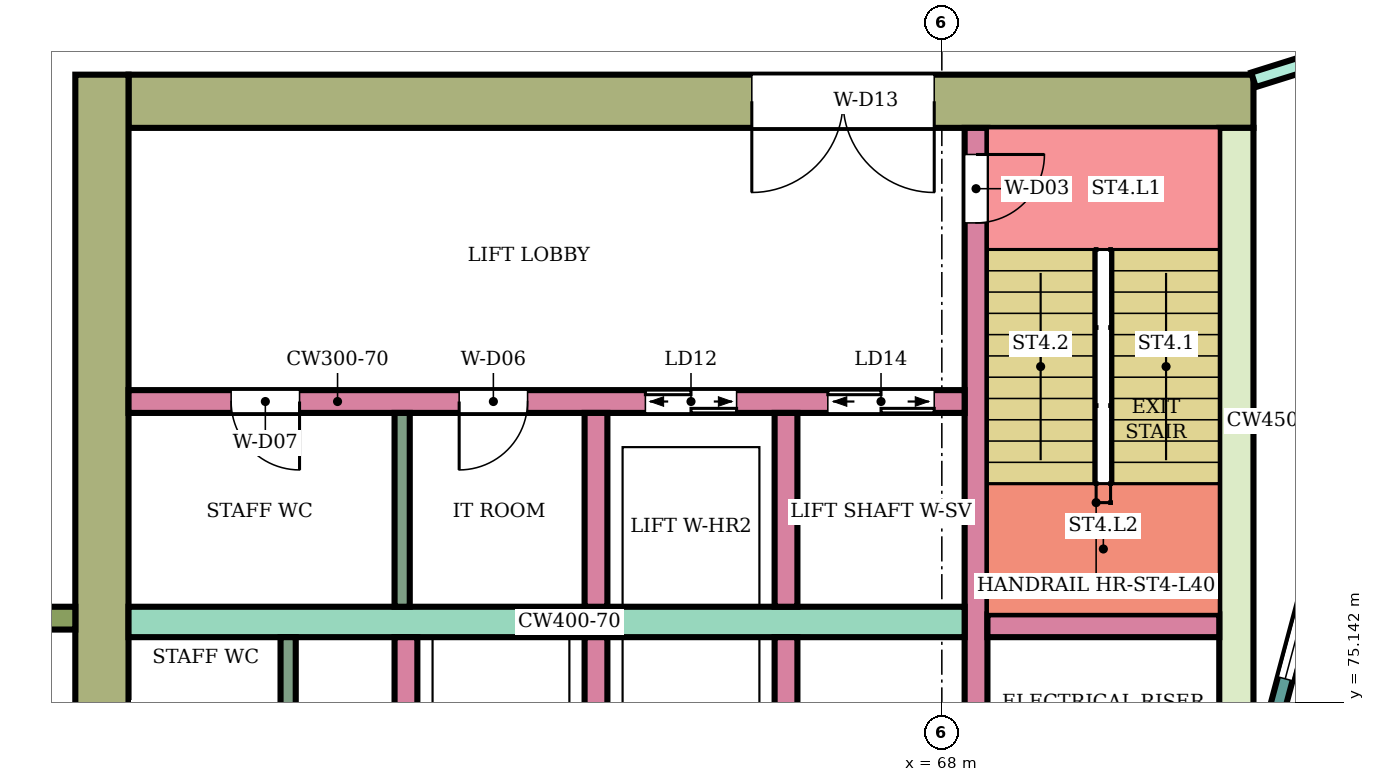
"""IFC4 building model, lengths in metres.
Left out: names, types, materials, properties, quantities, classifications, styles, units other than length and angle.
Written with IfcOpenShell. Run it as: python <this file> out.ifc"""

import sys

from ifc_helpers import new_model, si_unit, direction, frame, frame_2d, origin, place, context, subcontext, project, spatial, rectangle, extrude, element, fill, save


model = new_model("IFC4")
c1 = context("Model", 3, precision=1e-05, world=origin(), true_north=direction((0.0, 1.0)))
c2 = subcontext(c1, "Body", "Model", "MODEL_VIEW")
j1 = project(units=[si_unit("LENGTHUNIT", "METRE"), si_unit("PLANEANGLEUNIT", "RADIAN")], contexts=[c1])
p1 = place(None, origin())
s1 = spatial("IfcSite", under=j1, at=p1, CompositionType="ELEMENT")
p2 = place(p1, origin())
s2 = spatial("IfcBuilding", under=s1, at=p2, CompositionType="ELEMENT")
p3 = place(p2, frame((0.0, 0.0, 174.1)))
s3 = spatial("IfcBuildingStorey", under=s2, at=p3, CompositionType="ELEMENT", Elevation=174.1)
p4 = place(p3, frame((72.1, 83.05, 0.0), z_axis=(0.0, 0.0, 1.0), x_axis=(-1.0, 0.0, 0.0)))
e1 = element("IfcWall", 1, at=p4, inside=s3, PredefinedType="SHEAR", context=c2, shape_type="SweptSolid", body=[
    extrude(rectangle(XDim=14.8, YDim=0.7, at=frame_2d((7.4, 0.0))), origin(), (0.0, 0.0, 1.0), 3.78),
])
p5 = place(p4, frame((4.2, 0.0, 0.0)))
e2 = element("IfcOpeningElement", 2, at=p5, cuts=e1, PredefinedType="OPENING", context=c2, shape_type="SweptSolid", body=[
    extrude(rectangle(XDim=2.4, YDim=2.4, at=frame_2d((1.2, 1.2))), frame((0.0, 0.36, 0.0), z_axis=(0.0, -1.0, 0.0), x_axis=(1.0, 0.0, 0.0)), (0.0, 0.0, 1.0), 0.72),
])
p6 = place(p3, frame((71.875, 82.7, 0.0), z_axis=(0.0, 0.0, 1.0), x_axis=(0.0, -1.0, 0.0)))
e3 = element("IfcWall", 3, at=p6, inside=s3, PredefinedType="SHEAR", context=c2, shape_type="SweptSolid", body=[
    extrude(rectangle(XDim=7.7, YDim=0.45, at=frame_2d((3.85, 0.0))), origin(), (0.0, 0.0, 1.0), 3.78),
])
p7 = place(p3, frame((56.95, 83.4, 0.0), z_axis=(0.0, 0.0, 1.0), x_axis=(0.0, -1.0, 0.0)))
e4 = element("IfcWall", 4, at=p7, inside=s3, PredefinedType="SHEAR", context=c2, shape_type="SweptSolid", body=[
    extrude(rectangle(XDim=16.8, YDim=0.7, at=frame_2d((8.4, 0.0))), origin(), (0.0, 0.0, 1.0), 3.78),
])
p8 = place(p3, frame((68.45, 82.7, 0.0), z_axis=(0.0, 0.0, 1.0), x_axis=(0.0, -1.0, 0.0)))
e5 = element("IfcWall", 5, at=p8, inside=s3, PredefinedType="SHEAR", context=c2, shape_type="SweptSolid", body=[
    extrude(rectangle(XDim=7.7, YDim=0.3, at=frame_2d((3.85, 0.0))), origin(), (0.0, 0.0, 1.0), 3.78),
])
p9 = place(p8, frame((0.35, 0.0, 0.0)))
e6 = element("IfcOpeningElement", 6, at=p9, cuts=e5, PredefinedType="OPENING", context=c2, shape_type="SweptSolid", body=[
    extrude(rectangle(XDim=0.9, YDim=2.1, at=frame_2d((0.45, 1.05))), frame((0.0, 0.16, 0.0), z_axis=(0.0, -1.0, 0.0), x_axis=(1.0, 0.0, 0.0)), (0.0, 0.0, 1.0), 0.32),
])
p10 = place(p3, frame((71.65, 76.15, 0.0), z_axis=(0.0, 0.0, 1.0), x_axis=(-1.0, 0.0, 0.0)))
e7 = element("IfcWall", 7, at=p10, inside=s3, PredefinedType="SHEAR", context=c2, shape_type="SweptSolid", body=[
    extrude(rectangle(XDim=3.05, YDim=0.3, at=frame_2d((1.525, 0.0))), origin(), (0.0, 0.0, 1.0), 3.78),
])
p11 = place(p3, frame((68.3, 76.2, 0.0), z_axis=(0.0, 0.0, 1.0), x_axis=(-1.0, 0.0, 0.0)))
e8 = element("IfcWall", 8, at=p11, inside=s3, PredefinedType="SHEAR", context=c2, shape_type="SweptSolid", body=[
    extrude(rectangle(XDim=11.0, YDim=0.4, at=frame_2d((5.5, 0.0))), origin(), (0.0, 0.0, 1.0), 3.78),
])
p12 = place(p3, frame((68.3, 79.1, 0.0), z_axis=(0.0, 0.0, 1.0), x_axis=(-1.0, 0.0, 0.0)))
e9 = element("IfcWall", 9, at=p12, inside=s3, PredefinedType="SHEAR", context=c2, shape_type="SweptSolid", body=[
    extrude(rectangle(XDim=11.0, YDim=0.3, at=frame_2d((5.5, 0.0))), origin(), (0.0, 0.0, 1.0), 3.78),
])
p13 = place(p12, frame((0.4, 0.0, 0.0)))
e10 = element("IfcOpeningElement", 10, at=p13, cuts=e9, PredefinedType="OPENING", context=c2, shape_type="SweptSolid", body=[
    extrude(rectangle(XDim=1.4, YDim=2.1, at=frame_2d((0.7, 1.05))), frame((0.0, 0.16, 0.0), z_axis=(0.0, -1.0, 0.0), x_axis=(1.0, 0.0, 0.0)), (0.0, 0.0, 1.0), 0.32),
])
p14 = place(p12, frame((3.0, 0.0, 0.0)))
e11 = element("IfcOpeningElement", 11, at=p14, cuts=e9, PredefinedType="OPENING", context=c2, shape_type="SweptSolid", body=[
    extrude(rectangle(XDim=1.2, YDim=2.1, at=frame_2d((0.6, 1.05))), frame((0.0, 0.16, 0.0), z_axis=(0.0, -1.0, 0.0), x_axis=(1.0, 0.0, 0.0)), (0.0, 0.0, 1.0), 0.32),
])
p15 = place(p12, frame((5.75, 0.0, 0.0)))
e12 = element("IfcOpeningElement", 12, at=p15, cuts=e9, PredefinedType="OPENING", context=c2, shape_type="SweptSolid", body=[
    extrude(rectangle(XDim=0.9, YDim=2.1, at=frame_2d((0.45, 1.05))), frame((0.0, 0.16, 0.0), z_axis=(0.0, -1.0, 0.0), x_axis=(1.0, 0.0, 0.0)), (0.0, 0.0, 1.0), 0.32),
])
p16 = place(p12, frame((8.75, 0.0, 0.0)))
e13 = element("IfcOpeningElement", 13, at=p16, cuts=e9, PredefinedType="OPENING", context=c2, shape_type="SweptSolid", body=[
    extrude(rectangle(XDim=0.9, YDim=2.1, at=frame_2d((0.45, 1.05))), frame((0.0, 0.16, 0.0), z_axis=(0.0, -1.0, 0.0), x_axis=(1.0, 0.0, 0.0)), (0.0, 0.0, 1.0), 0.32),
])
for number, where, z_axis, x_axis in (
    (14, (65.95, 76.0, 0.0), (0.0, 0.0, 1.0), (0.0, -1.0, 0.0)),
    (15, (63.45, 76.0, 0.0), (0.0, 0.0, 1.0), (0.0, -1.0, 0.0)),
    (16, (60.95, 76.0, 0.0), (0.0, 0.0, 1.0), (0.0, -1.0, 0.0)),
    (17, (65.95, 78.95, 0.0), (0.0, 0.0, 1.0), (0.0, -1.0, 0.0)),
    (18, (63.45, 78.95, 0.0), (0.0, 0.0, 1.0), (0.0, -1.0, 0.0)),
):
    element("IfcWall", number, at=place(p3, frame(where, z_axis=z_axis, x_axis=x_axis)), inside=s3, PredefinedType="SHEAR", context=c2, shape_type="SweptSolid", body=[
        extrude(rectangle(XDim=2.55, YDim=0.3, at=frame_2d((1.275, 0.0))), origin(), (0.0, 0.0, 1.0), 3.78),
    ])
p17 = place(p3, frame((56.6, 76.25, 0.0), z_axis=(0.0, 0.0, 1.0), x_axis=(-1.0, 0.0, 0.0)))
e19 = element("IfcWall", 19, at=p17, inside=s3, PredefinedType="NOTDEFINED", context=c2, shape_type="SweptSolid", body=[
    extrude(rectangle(XDim=2.416, YDim=0.3, at=frame_2d((1.208, 0.0))), origin(), (0.0, 0.0, 1.0), 4.1),
])
p18 = place(p3, frame((73.415, 78.802, 0.0), z_axis=(0.0, 0.0, 1.0), x_axis=(-0.258789828301, -0.965933654434, 0.0)))
e20 = element("IfcWall", 20, at=p18, inside=s3, PredefinedType="NOTDEFINED", context=c2, shape_type="SweptSolid", body=[
    extrude(rectangle(XDim=3.936, YDim=0.2, at=frame_2d((1.968, 0.0))), origin(), (0.0, 0.0, 1.0), 4.1),
])
p19 = place(p18, frame((0.468, 0.0, 0.9)))
e21 = element("IfcOpeningElement", 21, at=p19, cuts=e20, PredefinedType="OPENING", context=c2, shape_type="SweptSolid", body=[
    extrude(rectangle(XDim=3.0, YDim=2.3, at=frame_2d((1.5, 1.15))), frame((0.0, 0.11, 0.0), z_axis=(0.0, -1.0, 0.0), x_axis=(1.0, 0.0, 0.0)), (0.0, 0.0, 1.0), 0.22),
])
p20 = place(p3, frame((72.1, 83.332, 0.0), z_axis=(0.0, 0.0, 1.0), x_axis=(0.954233106619, 0.299063836383, 0.0)))
e22 = element("IfcWall", 22, at=p20, inside=s3, PredefinedType="PARTITIONING", context=c2, shape_type="SweptSolid", body=[
    extrude(rectangle(XDim=2.414, YDim=0.2, at=frame_2d((1.207, 0.0))), origin(), (0.0, 0.0, 1.0), 3.65),
])
p21 = place(p20, frame((0.762, 0.0, 0.0)))
e23 = element("IfcOpeningElement", 23, at=p21, cuts=e22, PredefinedType="OPENING", context=c2, shape_type="SweptSolid", body=[
    extrude(rectangle(XDim=0.9, YDim=2.1, at=frame_2d((0.45, 1.05))), frame((0.0, 0.11, 0.0), z_axis=(0.0, -1.0, 0.0), x_axis=(1.0, 0.0, 0.0)), (0.0, 0.0, 1.0), 0.22),
])
for number, where, z_axis, x_axis in (
    (24, (59.4, 76.0, 0.0), (0.0, 0.0, 1.0), (0.0, -1.0, 0.0)),
    (25, (60.9, 78.95, 0.0), (0.0, 0.0, 1.0), (0.0, -1.0, 0.0)),
):
    element("IfcWall", number, at=place(p3, frame(where, z_axis=z_axis, x_axis=x_axis)), inside=s3, PredefinedType="PARTITIONING", context=c2, shape_type="SweptSolid", body=[
        extrude(rectangle(XDim=2.55, YDim=0.2, at=frame_2d((1.275, 0.0))), origin(), (0.0, 0.0, 1.0), 3.78),
    ])
p22 = place(p19, origin())
e26 = element("IfcWindow", 26, at=p22, inside=s3, PartitioningType="SINGLE_PANEL", PredefinedType="WINDOW", context=c2, shape_type="SweptSolid", body=[
    extrude(rectangle(XDim=3.0, YDim=2.3, at=frame_2d((1.5, 1.15))), frame((0.0, 0.03, 0.0), z_axis=(0.0, -1.0, 0.0), x_axis=(1.0, 0.0, 0.0)), (0.0, 0.0, 1.0), 0.06),
])
fill(e21, e26)
p23 = place(p9, origin())
e27 = element("IfcDoor", 27, at=p23, inside=s3, OperationType="SINGLE_SWING_LEFT", PredefinedType="DOOR", context=c2, shape_type="SweptSolid", body=[
    extrude(rectangle(XDim=0.9, YDim=2.1, at=frame_2d((0.45, 1.05))), frame((0.0, 0.025, 0.0), z_axis=(0.0, -1.0, 0.0), x_axis=(1.0, 0.0, 0.0)), (0.0, 0.0, 1.0), 0.05),
])
fill(e6, e27)
p24 = place(p13, origin())
e28 = element("IfcDoor", 28, at=p24, inside=s3, OperationType="DOUBLE_DOOR_SLIDING", PredefinedType="DOOR", context=c2, shape_type="SweptSolid", body=[
    extrude(rectangle(XDim=1.4, YDim=2.1, at=frame_2d((0.7, 1.05))), frame((0.0, 0.025, 0.0), z_axis=(0.0, -1.0, 0.0), x_axis=(1.0, 0.0, 0.0)), (0.0, 0.0, 1.0), 0.05),
])
fill(e10, e28)
p25 = place(p14, origin())
e29 = element("IfcDoor", 29, at=p25, inside=s3, OperationType="DOUBLE_DOOR_SLIDING", PredefinedType="DOOR", context=c2, shape_type="SweptSolid", body=[
    extrude(rectangle(XDim=1.2, YDim=2.1, at=frame_2d((0.6, 1.05))), frame((0.0, 0.025, 0.0), z_axis=(0.0, -1.0, 0.0), x_axis=(1.0, 0.0, 0.0)), (0.0, 0.0, 1.0), 0.05),
])
fill(e11, e29)
p26 = place(p15, origin())
e30 = element("IfcDoor", 30, at=p26, inside=s3, OperationType="SINGLE_SWING_RIGHT", PredefinedType="DOOR", context=c2, shape_type="SweptSolid", body=[
    extrude(rectangle(XDim=0.9, YDim=2.1, at=frame_2d((0.45, 1.05))), frame((0.0, 0.025, 0.0), z_axis=(0.0, -1.0, 0.0), x_axis=(1.0, 0.0, 0.0)), (0.0, 0.0, 1.0), 0.05),
])
fill(e12, e30)
p27 = place(p16, origin())
e31 = element("IfcDoor", 31, at=p27, inside=s3, OperationType="SINGLE_SWING_LEFT", PredefinedType="DOOR", context=c2, shape_type="SweptSolid", body=[
    extrude(rectangle(XDim=0.9, YDim=2.1, at=frame_2d((0.45, 1.05))), frame((0.0, 0.025, 0.0), z_axis=(0.0, -1.0, 0.0), x_axis=(1.0, 0.0, 0.0)), (0.0, 0.0, 1.0), 0.05),
])
fill(e13, e31)
p28 = place(p5, origin())
e32 = element("IfcDoor", 32, at=p28, inside=s3, OperationType="DOUBLE_DOOR_SINGLE_SWING", PredefinedType="DOOR", context=c2, shape_type="SweptSolid", body=[
    extrude(rectangle(XDim=2.4, YDim=2.4, at=frame_2d((1.2, 1.2))), frame((0.0, 0.025, 0.0), z_axis=(0.0, -1.0, 0.0), x_axis=(1.0, 0.0, 0.0)), (0.0, 0.0, 1.0), 0.05),
])
fill(e2, e32)
save(model, sys.argv[1])
